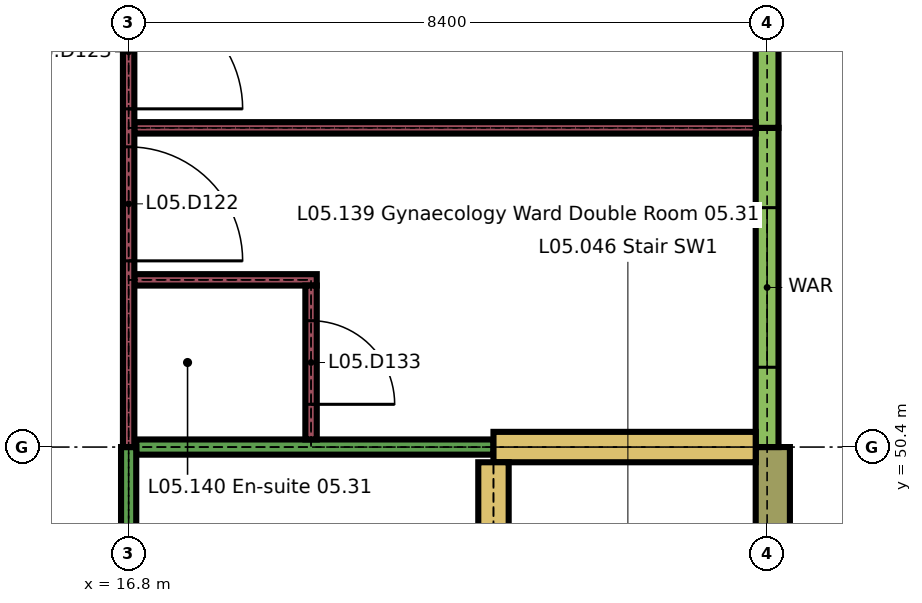
"""IFC4 building model, lengths in metres.
Left out: names, types, materials, properties, quantities, classifications, styles, units other than length and angle.
Written with IfcOpenShell. Run it as: python <this file> out.ifc"""

import sys

from ifc_helpers import new_model, si_unit, direction, frame, frame_2d, origin, place, context, subcontext, project, spatial, rectangle, extrude, element, fill, save


model = new_model("IFC4")
c1 = context("Model", 3, precision=1e-05, world=origin(), true_north=direction((0.0, 1.0)))
c2 = subcontext(c1, "Body", "Model", "MODEL_VIEW")
j1 = project(units=[si_unit("LENGTHUNIT", "METRE"), si_unit("PLANEANGLEUNIT", "RADIAN")], contexts=[c1])
p1 = place(None, origin())
s1 = spatial("IfcSite", under=j1, at=p1, CompositionType="ELEMENT")
p2 = place(p1, origin())
s2 = spatial("IfcBuilding", under=s1, at=p2, CompositionType="ELEMENT")
p3 = place(p2, frame((0.0, 0.0, 22.5)))
s3 = spatial("IfcBuildingStorey", under=s2, at=p3, CompositionType="ELEMENT", Elevation=22.5)
p4 = place(p3, frame((25.275, 46.55, 0.0), z_axis=(0.0, 0.0, 1.0), x_axis=(0.0, 1.0, 0.0)))
e1 = element("IfcWall", 1, at=p4, inside=s3, PredefinedType="SOLIDWALL", context=c2, shape_type="SweptSolid", body=[
    extrude(rectangle(XDim=3.85, YDim=0.45, at=frame_2d((1.925, 0.0))), origin(), (0.0, 0.0, 1.0), 3.26),
])
p5 = place(p3, frame((25.2, 50.4, 0.0), z_axis=(0.0, 0.0, 1.0), x_axis=(0.0, 1.0, 0.0)))
e2 = element("IfcWall", 2, at=p5, inside=s3, PredefinedType="SOLIDWALL", context=c2, shape_type="SweptSolid", body=[
    extrude(rectangle(XDim=4.2, YDim=0.3, at=frame_2d((2.1, 0.0))), origin(), (0.0, 0.0, 1.0), 2.96),
])
p6 = place(p5, frame((1.05, 0.0, 0.9)))
e3 = element("IfcOpeningElement", 3, at=p6, cuts=e2, PredefinedType="OPENING", context=c2, shape_type="SweptSolid", body=[
    extrude(rectangle(XDim=2.1, YDim=1.5, at=frame_2d((1.05, 0.75))), frame((0.0, 0.16, 0.0), z_axis=(0.0, -1.0, 0.0), x_axis=(1.0, 0.0, 0.0)), (0.0, 0.0, 1.0), 0.32),
])
p7 = place(p3, frame((25.2, 54.6, 0.0), z_axis=(0.0, 0.0, 1.0), x_axis=(0.0, 1.0, 0.0)))
e4 = element("IfcWall", 4, at=p7, inside=s3, PredefinedType="SOLIDWALL", context=c2, shape_type="SweptSolid", body=[
    extrude(rectangle(XDim=3.85, YDim=0.3, at=frame_2d((1.925, 0.0))), origin(), (0.0, 0.0, 1.0), 2.96),
])
p8 = place(p7, frame((1.05, 0.0, 0.9)))
e5 = element("IfcOpeningElement", 5, at=p8, cuts=e4, PredefinedType="OPENING", context=c2, shape_type="SweptSolid", body=[
    extrude(rectangle(XDim=2.1, YDim=1.5, at=frame_2d((1.05, 0.75))), frame((0.0, 0.16, 0.0), z_axis=(0.0, -1.0, 0.0), x_axis=(1.0, 0.0, 0.0)), (0.0, 0.0, 1.0), 0.32),
])
p9 = place(p3, frame((16.9, 50.4, 0.0), z_axis=(0.0, 0.0, 1.0), x_axis=(1.0, 0.0, 0.0)))
e6 = element("IfcWall", 6, at=p9, inside=s3, PredefinedType="PARTITIONING", context=c2, shape_type="SweptSolid", body=[
    extrude(rectangle(XDim=4.7, YDim=0.2, at=frame_2d((2.35, 0.0))), origin(), (0.0, 0.0, 1.0), 3.26),
])
p10 = place(p3, frame((21.6, 50.4, 0.0), z_axis=(0.0, 0.0, 1.0), x_axis=(1.0, 0.0, 0.0)))
e7 = element("IfcWall", 7, at=p10, inside=s3, PredefinedType="SHEAR", context=c2, shape_type="SweptSolid", body=[
    extrude(rectangle(XDim=3.45, YDim=0.4, at=frame_2d((1.725, 0.0))), origin(), (0.0, 0.0, 1.0), 3.26),
])
p11 = place(p3, frame((16.875, 52.6, 0.0), z_axis=(0.0, 0.0, 1.0), x_axis=(1.0, 0.0, 0.0)))
e8 = element("IfcWall", 8, at=p11, inside=s3, PredefinedType="PARTITIONING", context=c2, shape_type="SweptSolid", body=[
    extrude(rectangle(XDim=2.4, YDim=0.15, at=frame_2d((1.2, 0.0))), origin(), (0.0, 0.0, 1.0), 3.26),
])
p12 = place(p3, frame((16.875, 54.6, 0.0), z_axis=(0.0, 0.0, 1.0), x_axis=(1.0, 0.0, 0.0)))
e9 = element("IfcWall", 9, at=p12, inside=s3, PredefinedType="PARTITIONING", context=c2, shape_type="SweptSolid", body=[
    extrude(rectangle(XDim=8.175, YDim=0.15, at=frame_2d((4.087, 0.0))), origin(), (0.0, 0.0, 1.0), 3.26),
])
p13 = place(p3, frame((16.8, 42.1, 0.0), z_axis=(0.0, 0.0, 1.0), x_axis=(0.0, 1.0, 0.0)))
e10 = element("IfcWall", 10, at=p13, inside=s3, PredefinedType="PARTITIONING", context=c2, shape_type="SweptSolid", body=[
    extrude(rectangle(XDim=8.3, YDim=0.2, at=frame_2d((4.15, 0.0))), origin(), (0.0, 0.0, 1.0), 3.26),
])
p14 = place(p13, frame((3.15, 0.0, 0.0)))
e11 = element("IfcOpeningElement", 11, at=p14, cuts=e10, PredefinedType="OPENING", context=c2, shape_type="SweptSolid", body=[
    extrude(rectangle(XDim=2.0, YDim=2.4, at=frame_2d((1.0, 1.2))), frame((0.0, 0.11, 0.0), z_axis=(0.0, -1.0, 0.0), x_axis=(1.0, 0.0, 0.0)), (0.0, 0.0, 1.0), 0.22),
])
p15 = place(p3, frame((16.8, 50.4, 0.0), z_axis=(0.0, 0.0, 1.0), x_axis=(0.0, 1.0, 0.0)))
e12 = element("IfcWall", 12, at=p15, inside=s3, PredefinedType="PARTITIONING", context=c2, shape_type="SweptSolid", body=[
    extrude(rectangle(XDim=8.05, YDim=0.15, at=frame_2d((4.025, 0.0))), origin(), (0.0, 0.0, 1.0), 3.26),
])
p16 = place(p15, frame((2.45, 0.0, 0.0)))
e13 = element("IfcOpeningElement", 13, at=p16, cuts=e12, PredefinedType="OPENING", context=c2, shape_type="SweptSolid", body=[
    extrude(rectangle(XDim=1.5, YDim=2.4, at=frame_2d((0.75, 1.2))), frame((0.0, 0.085, 0.0), z_axis=(0.0, -1.0, 0.0), x_axis=(1.0, 0.0, 0.0)), (0.0, 0.0, 1.0), 0.17),
])
p17 = place(p15, frame((4.45, 0.0, 0.0)))
e14 = element("IfcOpeningElement", 14, at=p17, cuts=e12, PredefinedType="OPENING", context=c2, shape_type="SweptSolid", body=[
    extrude(rectangle(XDim=1.5, YDim=2.4, at=frame_2d((0.75, 1.2))), frame((0.0, 0.085, 0.0), z_axis=(0.0, -1.0, 0.0), x_axis=(1.0, 0.0, 0.0)), (0.0, 0.0, 1.0), 0.17),
])
p18 = place(p3, frame((19.2, 50.5, 0.0), z_axis=(0.0, 0.0, 1.0), x_axis=(0.0, 1.0, 0.0)))
e15 = element("IfcWall", 15, at=p18, inside=s3, PredefinedType="PARTITIONING", context=c2, shape_type="SweptSolid", body=[
    extrude(rectangle(XDim=2.025, YDim=0.15, at=frame_2d((1.012, 0.0))), origin(), (0.0, 0.0, 1.0), 3.26),
])
p19 = place(p18, frame((0.462, 0.0, 0.0)))
e16 = element("IfcOpeningElement", 16, at=p19, cuts=e15, PredefinedType="OPENING", context=c2, shape_type="SweptSolid", body=[
    extrude(rectangle(XDim=1.1, YDim=2.1, at=frame_2d((0.55, 1.05))), frame((0.0, 0.085, 0.0), z_axis=(0.0, -1.0, 0.0), x_axis=(1.0, 0.0, 0.0)), (0.0, 0.0, 1.0), 0.17),
])
p20 = place(p3, frame((21.6, 42.2, 0.0), z_axis=(0.0, 0.0, 1.0), x_axis=(0.0, 1.0, 0.0)))
e17 = element("IfcWall", 17, at=p20, inside=s3, PredefinedType="SHEAR", context=c2, shape_type="SweptSolid", body=[
    extrude(rectangle(XDim=8.0, YDim=0.4, at=frame_2d((4.0, 0.0))), origin(), (0.0, 0.0, 1.0), 3.26),
])
p21 = place(p20, frame((0.4, 0.0, 0.0)))
e18 = element("IfcOpeningElement", 18, at=p21, cuts=e17, PredefinedType="OPENING", context=c2, shape_type="SweptSolid", body=[
    extrude(rectangle(XDim=1.2, YDim=2.1, at=frame_2d((0.6, 1.05))), frame((0.0, 0.21, 0.0), z_axis=(0.0, -1.0, 0.0), x_axis=(1.0, 0.0, 0.0)), (0.0, 0.0, 1.0), 0.42),
])
p22 = place(p6, origin())
e19 = element("IfcWindow", 19, at=p22, inside=s3, PartitioningType="DOUBLE_PANEL_VERTICAL", PredefinedType="WINDOW", context=c2, shape_type="SweptSolid", body=[
    extrude(rectangle(XDim=2.1, YDim=1.5, at=frame_2d((1.05, 0.75))), frame((0.0, 0.05, 0.0), z_axis=(0.0, -1.0, 0.0), x_axis=(1.0, 0.0, 0.0)), (0.0, 0.0, 1.0), 0.1),
])
fill(e3, e19)
p23 = place(p16, origin())
e20 = element("IfcDoor", 20, at=p23, inside=s3, OperationType="SINGLE_SWING_LEFT", PredefinedType="DOOR", context=c2, shape_type="SweptSolid", body=[
    extrude(rectangle(XDim=1.5, YDim=2.4, at=frame_2d((0.75, 1.2))), frame((0.0, 0.03, 0.0), z_axis=(0.0, -1.0, 0.0), x_axis=(1.0, 0.0, 0.0)), (0.0, 0.0, 1.0), 0.06),
])
fill(e13, e20)
p24 = place(p17, origin())
e21 = element("IfcDoor", 21, at=p24, inside=s3, OperationType="SINGLE_SWING_LEFT", PredefinedType="DOOR", context=c2, shape_type="SweptSolid", body=[
    extrude(rectangle(XDim=1.5, YDim=2.4, at=frame_2d((0.75, 1.2))), frame((0.0, 0.03, 0.0), z_axis=(0.0, -1.0, 0.0), x_axis=(1.0, 0.0, 0.0)), (0.0, 0.0, 1.0), 0.06),
])
fill(e14, e21)
p25 = place(p19, origin())
e22 = element("IfcDoor", 22, at=p25, inside=s3, OperationType="SINGLE_SWING_LEFT", PredefinedType="DOOR", context=c2, shape_type="SweptSolid", body=[
    extrude(rectangle(XDim=1.1, YDim=2.1, at=frame_2d((0.55, 1.05))), frame((0.0, 0.025, 0.0), z_axis=(0.0, -1.0, 0.0), x_axis=(1.0, 0.0, 0.0)), (0.0, 0.0, 1.0), 0.05),
])
fill(e16, e22)
save(model, sys.argv[1])
